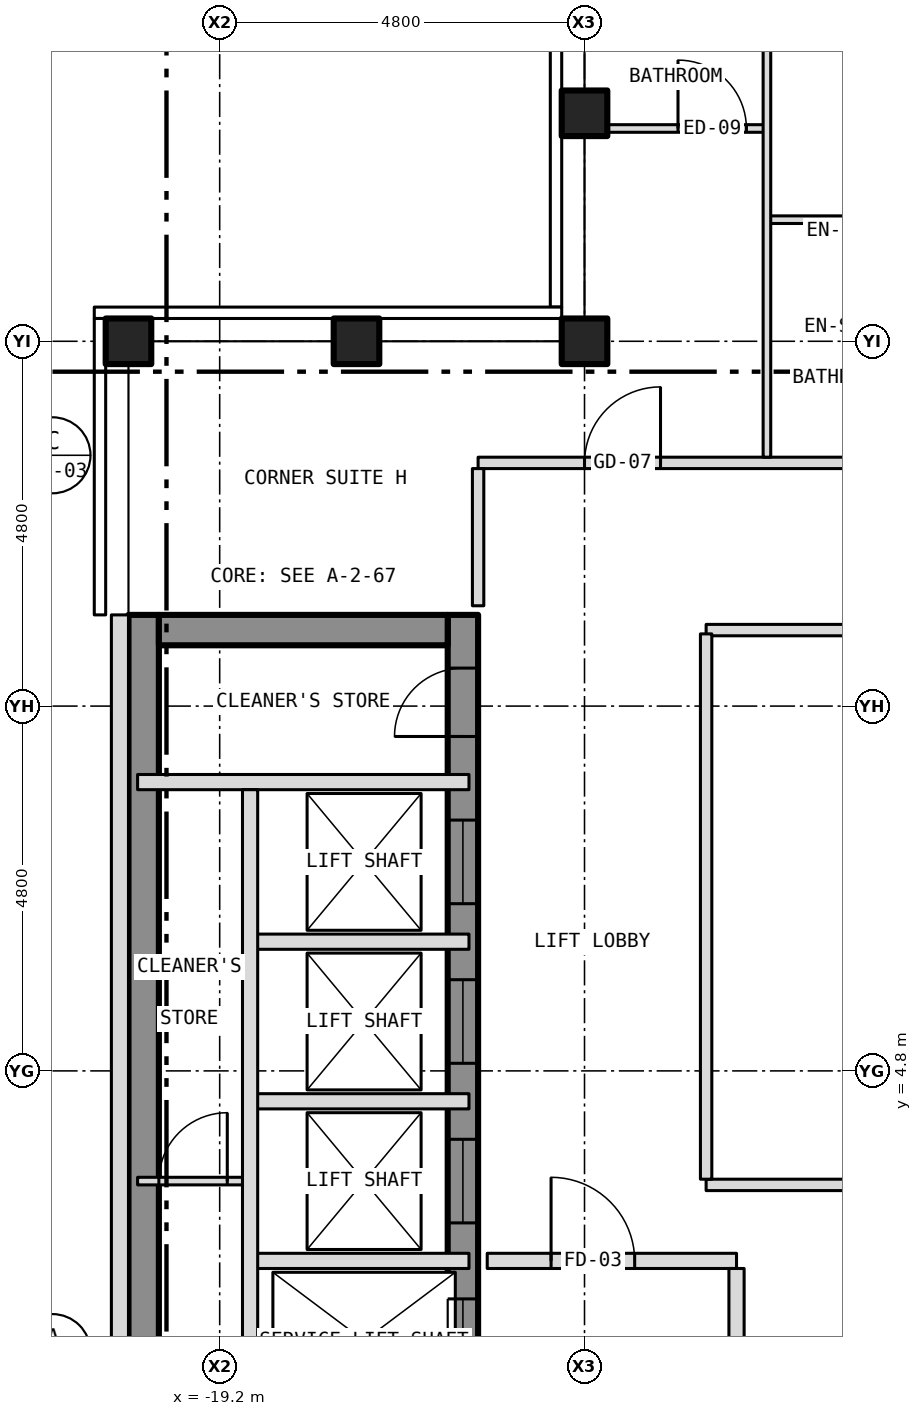
"""IFC4 building model, lengths in metres.
Left out: names, types, materials, properties, quantities, classifications, styles, units other than length and angle.
Written with IfcOpenShell. Run it as: python <this file> out.ifc"""

import sys

from ifc_helpers import new_model, si_unit, direction, frame, frame_2d, origin, origin_2d, place, context, subcontext, project, spatial, rectangle, hollow_rectangle, extrude, element, fill, save


model = new_model("IFC4")
c1 = context("Model", 3, precision=1e-05, world=origin(), true_north=direction((0.0, 1.0)))
c2 = subcontext(c1, "Body", "Model", "MODEL_VIEW")
j1 = project(units=[si_unit("LENGTHUNIT", "METRE"), si_unit("PLANEANGLEUNIT", "RADIAN")], contexts=[c1])
p1 = place(None, origin())
s1 = spatial("IfcSite", under=j1, at=p1, CompositionType="ELEMENT")
p2 = place(p1, origin())
s2 = spatial("IfcBuilding", under=s1, at=p2, CompositionType="ELEMENT")
p3 = place(p2, frame((0.0, 0.0, 244.5)))
s3 = spatial("IfcBuildingStorey", under=s2, at=p3, CompositionType="ELEMENT", Elevation=244.5)
for number, where, z_axis, x_axis in (
    (1, (-20.4, 14.4, -0.15), (0.0, 0.0, 1.0), (1.0, 0.0, 0.0)),
    (2, (-14.4, 14.4, -0.15), (0.0, 0.0, 1.0), (1.0, 0.0, 0.0)),
    (3, (-14.4, 17.4, -0.15), (0.0, 0.0, 1.0), (1.0, 0.0, 0.0)),
    (4, (-17.4, 14.4, -0.15), (0.0, 0.0, 1.0), (1.0, 0.0, 0.0)),
):
    element("IfcColumn", number, at=place(p3, frame(where, z_axis=z_axis, x_axis=x_axis)), inside=s3, PredefinedType="COLUMN", context=c2, shape_type="SweptSolid", body=[
        extrude(hollow_rectangle(XDim=0.6, YDim=0.6, WallThickness=0.03, at=origin_2d()), origin(), (0.0, 0.0, 1.0), 3.5),
    ])
p4 = place(p3, frame((-16.0, -10.8, 0.0), z_axis=(0.0, 0.0, 1.0), x_axis=(0.0, 1.0, 0.0)))
e5 = element("IfcWall", 5, at=p4, inside=s3, PredefinedType="SHEAR", context=c2, shape_type="SweptSolid", body=[
    extrude(rectangle(XDim=21.6, YDim=0.4, at=frame_2d((10.8, 0.0))), origin(), (0.0, 0.0, 1.0), 3.25),
])
p5 = place(p4, frame((9.4, 0.0, 0.0)))
e6 = element("IfcOpeningElement", 6, at=p5, cuts=e5, PredefinedType="OPENING", context=c2, shape_type="SweptSolid", body=[
    extrude(rectangle(XDim=1.1, YDim=2.1, at=frame_2d((0.55, 1.05))), frame((0.0, 0.212, 0.0), z_axis=(0.0, -1.0, 0.0), x_axis=(1.0, 0.0, 0.0)), (0.0, 0.0, 1.0), 0.424),
])
p6 = place(p4, frame((11.5, 0.0, 0.0)))
e7 = element("IfcOpeningElement", 7, at=p6, cuts=e5, PredefinedType="OPENING", context=c2, shape_type="SweptSolid", body=[
    extrude(rectangle(XDim=1.1, YDim=2.1, at=frame_2d((0.55, 1.05))), frame((0.0, 0.212, 0.0), z_axis=(0.0, -1.0, 0.0), x_axis=(1.0, 0.0, 0.0)), (0.0, 0.0, 1.0), 0.424),
])
p7 = place(p4, frame((13.6, 0.0, 0.0)))
e8 = element("IfcOpeningElement", 8, at=p7, cuts=e5, PredefinedType="OPENING", context=c2, shape_type="SweptSolid", body=[
    extrude(rectangle(XDim=1.1, YDim=2.1, at=frame_2d((0.55, 1.05))), frame((0.0, 0.212, 0.0), z_axis=(0.0, -1.0, 0.0), x_axis=(1.0, 0.0, 0.0)), (0.0, 0.0, 1.0), 0.424),
])
p8 = place(p4, frame((15.7, 0.0, 0.0)))
e9 = element("IfcOpeningElement", 9, at=p8, cuts=e5, PredefinedType="OPENING", context=c2, shape_type="SweptSolid", body=[
    extrude(rectangle(XDim=1.1, YDim=2.1, at=frame_2d((0.55, 1.05))), frame((0.0, 0.212, 0.0), z_axis=(0.0, -1.0, 0.0), x_axis=(1.0, 0.0, 0.0)), (0.0, 0.0, 1.0), 0.424),
])
p9 = place(p4, frame((17.8, 0.0, 0.0)))
e10 = element("IfcOpeningElement", 10, at=p9, cuts=e5, PredefinedType="OPENING", context=c2, shape_type="SweptSolid", body=[
    extrude(rectangle(XDim=1.1, YDim=2.1, at=frame_2d((0.55, 1.05))), frame((0.0, 0.212, 0.0), z_axis=(0.0, -1.0, 0.0), x_axis=(1.0, 0.0, 0.0)), (0.0, 0.0, 1.0), 0.424),
])
p10 = place(p4, frame((0.458, 0.0, 0.0)))
e11 = element("IfcOpeningElement", 11, at=p10, cuts=e5, PredefinedType="OPENING", context=c2, shape_type="SweptSolid", body=[
    extrude(rectangle(XDim=1.1, YDim=2.1, at=frame_2d((0.55, 1.05))), frame((0.0, 0.212, 0.0), z_axis=(0.0, -1.0, 0.0), x_axis=(1.0, 0.0, 0.0)), (0.0, 0.0, 1.0), 0.424),
])
p11 = place(p4, frame((7.5, 0.0, 0.0)))
e12 = element("IfcOpeningElement", 12, at=p11, cuts=e5, PredefinedType="OPENING", context=c2, shape_type="SweptSolid", body=[
    extrude(rectangle(XDim=1.1, YDim=2.1, at=frame_2d((0.55, 1.05))), frame((0.0, 0.212, 0.0), z_axis=(0.0, -1.0, 0.0), x_axis=(1.0, 0.0, 0.0)), (0.0, 0.0, 1.0), 0.424),
])
p12 = place(p4, frame((20.0, 0.0, 0.0)))
e13 = element("IfcOpeningElement", 13, at=p12, cuts=e5, PredefinedType="OPENING", context=c2, shape_type="SweptSolid", body=[
    extrude(rectangle(XDim=0.9, YDim=2.1, at=frame_2d((0.45, 1.05))), frame((0.0, 0.212, 0.0), z_axis=(0.0, -1.0, 0.0), x_axis=(1.0, 0.0, 0.0)), (0.0, 0.0, 1.0), 0.424),
])
p13 = place(p3, frame((-20.2, -10.8, 0.0), z_axis=(0.0, 0.0, 1.0), x_axis=(0.0, 1.0, 0.0)))
e14 = element("IfcWall", 14, at=p13, inside=s3, PredefinedType="SHEAR", context=c2, shape_type="SweptSolid", body=[
    extrude(rectangle(XDim=21.6, YDim=0.4, at=frame_2d((10.8, 0.0))), origin(), (0.0, 0.0, 1.0), 3.25),
])
p14 = place(p3, frame((-20.0, 10.6, 0.0), z_axis=(0.0, 0.0, 1.0), x_axis=(1.0, 0.0, 0.0)))
e15 = element("IfcWall", 15, at=p14, inside=s3, PredefinedType="SHEAR", context=c2, shape_type="SweptSolid", body=[
    extrude(rectangle(XDim=3.8, YDim=0.4, at=frame_2d((1.9, 0.0))), origin(), (0.0, 0.0, 1.0), 3.25),
])
p15 = place(p3, frame((-20.512, 10.8, 0.0), z_axis=(0.0, 0.0, 1.0), x_axis=(0.0, -1.0, 0.0)))
e16 = element("IfcWall", 16, at=p15, inside=s3, PredefinedType="SOLIDWALL", context=c2, shape_type="SweptSolid", body=[
    extrude(rectangle(XDim=21.6, YDim=0.225, at=frame_2d((10.8, 0.0))), origin(), (0.0, 0.0, 1.0), 3.5),
])
p16 = place(p15, frame((18.05, 0.0, 1.0)))
e17 = element("IfcOpeningElement", 17, at=p16, cuts=e16, PredefinedType="OPENING", context=c2, shape_type="SweptSolid", body=[
    extrude(rectangle(XDim=0.6, YDim=1.5, at=frame_2d((0.3, 0.75))), frame((0.0, 0.125, 0.0), z_axis=(0.0, -1.0, 0.0), x_axis=(1.0, 0.0, 0.0)), (0.0, 0.0, 1.0), 0.249),
])
p17 = place(p3, frame((-18.8, 2.3, 0.0), z_axis=(0.0, 0.0, 1.0), x_axis=(1.0, 0.0, 0.0)))
e18 = element("IfcWall", 18, at=p17, inside=s3, PredefinedType="PARTITIONING", context=c2, shape_type="SweptSolid", body=[
    extrude(rectangle(XDim=2.88, YDim=0.2, at=frame_2d((1.44, 0.0))), origin(), (0.0, 0.0, 1.0), 3.25),
])
p18 = place(p3, frame((-15.68, 2.3, 0.0), z_axis=(0.0, 0.0, 1.0), x_axis=(1.0, 0.0, 0.0)))
e19 = element("IfcWall", 19, at=p18, inside=s3, PredefinedType="PARTITIONING", context=c2, shape_type="SweptSolid", body=[
    extrude(rectangle(XDim=3.28, YDim=0.2, at=frame_2d((1.64, 0.0))), origin(), (0.0, 0.0, 1.0), 3.35),
])
p19 = place(p18, frame((0.84, 0.0, 0.0)))
e20 = element("IfcOpeningElement", 20, at=p19, cuts=e19, PredefinedType="OPENING", context=c2, shape_type="SweptSolid", body=[
    extrude(rectangle(XDim=1.1, YDim=2.1, at=frame_2d((0.55, 1.05))), frame((0.0, 0.112, 0.0), z_axis=(0.0, -1.0, 0.0), x_axis=(1.0, 0.0, 0.0)), (0.0, 0.0, 1.0), 0.224),
])
p20 = place(p3, frame((-12.8, 3.3, 0.0), z_axis=(0.0, 0.0, 1.0), x_axis=(1.0, 0.0, 0.0)))
e21 = element("IfcWall", 21, at=p20, inside=s3, PredefinedType="PARTITIONING", context=c2, shape_type="SweptSolid", body=[
    extrude(rectangle(XDim=20.3, YDim=0.15, at=frame_2d((10.15, 0.0))), origin(), (0.0, 0.0, 1.0), 3.35),
])
p21 = place(p20, frame((16.1, 0.0, 0.0)))
e22 = element("IfcOpeningElement", 22, at=p21, cuts=e21, PredefinedType="OPENING", context=c2, shape_type="SweptSolid", body=[
    extrude(rectangle(XDim=0.9, YDim=2.1, at=frame_2d((0.45, 1.05))), frame((0.0, 0.087, 0.0), z_axis=(0.0, -1.0, 0.0), x_axis=(1.0, 0.0, 0.0)), (0.0, 0.0, 1.0), 0.174),
])
p22 = place(p3, frame((-20.28, 3.35, 0.0), z_axis=(0.0, 0.0, 1.0), x_axis=(1.0, 0.0, 0.0)))
e23 = element("IfcWall", 23, at=p22, inside=s3, PredefinedType="PARTITIONING", context=c2, shape_type="SweptSolid", body=[
    extrude(rectangle(XDim=1.48, YDim=0.1, at=frame_2d((0.74, 0.0))), origin(), (0.0, 0.0, 1.0), 3.25),
])
p23 = place(p22, frame((0.28, 0.0, 0.0)))
e24 = element("IfcOpeningElement", 24, at=p23, cuts=e23, PredefinedType="OPENING", context=c2, shape_type="SweptSolid", body=[
    extrude(rectangle(XDim=0.9, YDim=2.1, at=frame_2d((0.45, 1.05))), frame((0.0, 0.062, 0.0), z_axis=(0.0, -1.0, 0.0), x_axis=(1.0, 0.0, 0.0)), (0.0, 0.0, 1.0), 0.124),
])
for number, where, z_axis, x_axis in (
    (25, (-18.8, 4.4, 0.0), (0.0, 0.0, 1.0), (1.0, 0.0, 0.0)),
    (26, (-18.8, 6.5, 0.0), (0.0, 0.0, 1.0), (1.0, 0.0, 0.0)),
):
    element("IfcWall", number, at=place(p3, frame(where, z_axis=z_axis, x_axis=x_axis)), inside=s3, PredefinedType="PARTITIONING", context=c2, shape_type="SweptSolid", body=[
        extrude(rectangle(XDim=2.88, YDim=0.2, at=frame_2d((1.44, 0.0))), origin(), (0.0, 0.0, 1.0), 3.25),
    ])
p24 = place(p3, frame((-20.28, 8.6, 0.0), z_axis=(0.0, 0.0, 1.0), x_axis=(1.0, 0.0, 0.0)))
e27 = element("IfcWall", 27, at=p24, inside=s3, PredefinedType="PARTITIONING", context=c2, shape_type="SweptSolid", body=[
    extrude(rectangle(XDim=4.36, YDim=0.2, at=frame_2d((2.18, 0.0))), origin(), (0.0, 0.0, 1.0), 3.25),
])
p25 = place(p3, frame((-12.8, 10.6, 0.0), z_axis=(0.0, 0.0, 1.0), x_axis=(1.0, 0.0, 0.0)))
e28 = element("IfcWall", 28, at=p25, inside=s3, PredefinedType="PARTITIONING", context=c2, shape_type="SweptSolid", body=[
    extrude(rectangle(XDim=20.3, YDim=0.15, at=frame_2d((10.15, 0.0))), origin(), (0.0, 0.0, 1.0), 3.35),
])
p26 = place(p25, frame((5.95, 0.0, 0.0)))
e29 = element("IfcOpeningElement", 29, at=p26, cuts=e28, PredefinedType="OPENING", context=c2, shape_type="SweptSolid", body=[
    extrude(rectangle(XDim=0.9, YDim=2.1, at=frame_2d((0.45, 1.05))), frame((0.0, 0.087, 0.0), z_axis=(0.0, -1.0, 0.0), x_axis=(1.0, 0.0, 0.0)), (0.0, 0.0, 1.0), 0.174),
])
p27 = place(p3, frame((-15.8, 12.8, 0.0), z_axis=(0.0, 0.0, 1.0), x_axis=(1.0, 0.0, 0.0)))
e30 = element("IfcWall", 30, at=p27, inside=s3, PredefinedType="PARTITIONING", context=c2, shape_type="SweptSolid", body=[
    extrude(rectangle(XDim=31.6, YDim=0.15, at=frame_2d((15.8, 0.0))), origin(), (0.0, 0.0, 1.0), 3.35),
])
p28 = place(p27, frame((6.8, 0.0, 0.0)))
e31 = element("IfcOpeningElement", 31, at=p28, cuts=e30, PredefinedType="OPENING", context=c2, shape_type="SweptSolid", body=[
    extrude(rectangle(XDim=1.0, YDim=2.1, at=frame_2d((0.5, 1.05))), frame((0.0, 0.087, 0.0), z_axis=(0.0, -1.0, 0.0), x_axis=(1.0, 0.0, 0.0)), (0.0, 0.0, 1.0), 0.174),
])
p29 = place(p27, frame((15.35, 0.0, 0.0)))
e32 = element("IfcOpeningElement", 32, at=p29, cuts=e30, PredefinedType="OPENING", context=c2, shape_type="SweptSolid", body=[
    extrude(rectangle(XDim=0.9, YDim=2.1, at=frame_2d((0.45, 1.05))), frame((0.0, 0.087, 0.0), z_axis=(0.0, -1.0, 0.0), x_axis=(1.0, 0.0, 0.0)), (0.0, 0.0, 1.0), 0.174),
])
p30 = place(p27, frame((26.0, 0.0, 0.0)))
e33 = element("IfcOpeningElement", 33, at=p30, cuts=e30, PredefinedType="OPENING", context=c2, shape_type="SweptSolid", body=[
    extrude(rectangle(XDim=1.0, YDim=2.1, at=frame_2d((0.5, 1.05))), frame((0.0, 0.087, 0.0), z_axis=(0.0, -1.0, 0.0), x_axis=(1.0, 0.0, 0.0)), (0.0, 0.0, 1.0), 0.174),
])
p31 = place(p27, frame((1.4, 0.0, 0.0)))
e34 = element("IfcOpeningElement", 34, at=p31, cuts=e30, PredefinedType="OPENING", context=c2, shape_type="SweptSolid", body=[
    extrude(rectangle(XDim=1.0, YDim=2.1, at=frame_2d((0.5, 1.05))), frame((0.0, 0.087, 0.0), z_axis=(0.0, -1.0, 0.0), x_axis=(1.0, 0.0, 0.0)), (0.0, 0.0, 1.0), 0.174),
])
p32 = place(p27, frame((29.2, 0.0, 0.0)))
e35 = element("IfcOpeningElement", 35, at=p32, cuts=e30, PredefinedType="OPENING", context=c2, shape_type="SweptSolid", body=[
    extrude(rectangle(XDim=1.0, YDim=2.1, at=frame_2d((0.5, 1.05))), frame((0.0, 0.087, 0.0), z_axis=(0.0, -1.0, 0.0), x_axis=(1.0, 0.0, 0.0)), (0.0, 0.0, 1.0), 0.174),
])
p33 = place(p3, frame((-12.0, 16.0, 0.0), z_axis=(0.0, 0.0, 1.0), x_axis=(1.0, 0.0, 0.0)))
e36 = element("IfcWall", 36, at=p33, inside=s3, PredefinedType="PARTITIONING", context=c2, shape_type="SweptSolid", body=[
    extrude(rectangle(XDim=2.2, YDim=0.1, at=frame_2d((1.1, 0.0))), origin(), (0.0, 0.0, 1.0), 3.35),
])
p34 = place(p3, frame((-14.28, 17.2, 0.0), z_axis=(0.0, 0.0, 1.0), x_axis=(1.0, 0.0, 0.0)))
e37 = element("IfcWall", 37, at=p34, inside=s3, PredefinedType="PARTITIONING", context=c2, shape_type="SweptSolid", body=[
    extrude(rectangle(XDim=2.28, YDim=0.1, at=frame_2d((1.14, 0.0))), origin(), (0.0, 0.0, 1.0), 3.35),
])
p35 = place(p34, frame((1.11, 0.0, 0.0)))
e38 = element("IfcOpeningElement", 38, at=p35, cuts=e37, PredefinedType="OPENING", context=c2, shape_type="SweptSolid", body=[
    extrude(rectangle(XDim=0.9, YDim=2.1, at=frame_2d((0.45, 1.05))), frame((0.0, 0.062, 0.0), z_axis=(0.0, -1.0, 0.0), x_axis=(1.0, 0.0, 0.0)), (0.0, 0.0, 1.0), 0.124),
])
p36 = place(p3, frame((-18.8, -1.8, 0.0), z_axis=(0.0, 0.0, 1.0), x_axis=(0.0, 1.0, 0.0)))
e39 = element("IfcWall", 39, at=p36, inside=s3, PredefinedType="PARTITIONING", context=c2, shape_type="SweptSolid", body=[
    extrude(rectangle(XDim=10.3, YDim=0.2, at=frame_2d((5.15, 0.0))), origin(), (0.0, 0.0, 1.0), 3.25),
])
p37 = place(p3, frame((-15.8, 10.92, 0.0), z_axis=(0.0, 0.0, 1.0), x_axis=(0.0, 1.0, 0.0)))
e40 = element("IfcWall", 40, at=p37, inside=s3, PredefinedType="PARTITIONING", context=c2, shape_type="SweptSolid", body=[
    extrude(rectangle(XDim=1.805, YDim=0.15, at=frame_2d((0.903, 0.0))), origin(), (0.0, 0.0, 1.0), 3.35),
])
p38 = place(p3, frame((-12.8, 3.375, 0.0), z_axis=(0.0, 0.0, 1.0), x_axis=(0.0, 1.0, 0.0)))
e41 = element("IfcWall", 41, at=p38, inside=s3, PredefinedType="PARTITIONING", context=c2, shape_type="SweptSolid", body=[
    extrude(rectangle(XDim=7.175, YDim=0.15, at=frame_2d((3.587, 0.0))), origin(), (0.0, 0.0, 1.0), 3.35),
])
p39 = place(p3, frame((-12.4, -1.8, 0.0), z_axis=(0.0, 0.0, 1.0), x_axis=(0.0, 1.0, 0.0)))
e42 = element("IfcWall", 42, at=p39, inside=s3, PredefinedType="PARTITIONING", context=c2, shape_type="SweptSolid", body=[
    extrude(rectangle(XDim=4.0, YDim=0.2, at=frame_2d((2.0, 0.0))), origin(), (0.0, 0.0, 1.0), 3.35),
])
p40 = place(p3, frame((-12.0, 12.875, 0.0), z_axis=(0.0, 0.0, 1.0), x_axis=(0.0, 1.0, 0.0)))
e43 = element("IfcWall", 43, at=p40, inside=s3, PredefinedType="PARTITIONING", context=c2, shape_type="SweptSolid", body=[
    extrude(rectangle(XDim=7.855, YDim=0.1, at=frame_2d((3.927, 0.0))), origin(), (0.0, 0.0, 1.0), 3.35),
])
p41 = place(p6, origin())
e44 = element("IfcDoor", 44, at=p41, inside=s3, OperationType="SLIDING_TO_LEFT", PredefinedType="DOOR", context=c2, shape_type="SweptSolid", body=[
    extrude(rectangle(XDim=1.1, YDim=2.1, at=frame_2d((0.55, 1.05))), frame((0.0, 0.025, 0.0), z_axis=(0.0, -1.0, 0.0), x_axis=(1.0, 0.0, 0.0)), (0.0, 0.0, 1.0), 0.05),
])
fill(e7, e44)
p42 = place(p7, origin())
e45 = element("IfcDoor", 45, at=p42, inside=s3, OperationType="SLIDING_TO_LEFT", PredefinedType="DOOR", context=c2, shape_type="SweptSolid", body=[
    extrude(rectangle(XDim=1.1, YDim=2.1, at=frame_2d((0.55, 1.05))), frame((0.0, 0.025, 0.0), z_axis=(0.0, -1.0, 0.0), x_axis=(1.0, 0.0, 0.0)), (0.0, 0.0, 1.0), 0.05),
])
fill(e8, e45)
p43 = place(p8, origin())
e46 = element("IfcDoor", 46, at=p43, inside=s3, OperationType="SLIDING_TO_LEFT", PredefinedType="DOOR", context=c2, shape_type="SweptSolid", body=[
    extrude(rectangle(XDim=1.1, YDim=2.1, at=frame_2d((0.55, 1.05))), frame((0.0, 0.025, 0.0), z_axis=(0.0, -1.0, 0.0), x_axis=(1.0, 0.0, 0.0)), (0.0, 0.0, 1.0), 0.05),
])
fill(e9, e46)
p44 = place(p9, origin())
e47 = element("IfcDoor", 47, at=p44, inside=s3, OperationType="SLIDING_TO_LEFT", PredefinedType="DOOR", context=c2, shape_type="SweptSolid", body=[
    extrude(rectangle(XDim=1.1, YDim=2.1, at=frame_2d((0.55, 1.05))), frame((0.0, 0.025, 0.0), z_axis=(0.0, -1.0, 0.0), x_axis=(1.0, 0.0, 0.0)), (0.0, 0.0, 1.0), 0.05),
])
fill(e10, e47)
p45 = place(p12, origin())
e48 = element("IfcDoor", 48, at=p45, inside=s3, OperationType="SINGLE_SWING_LEFT", PredefinedType="DOOR", context=c2, shape_type="SweptSolid", body=[
    extrude(rectangle(XDim=0.9, YDim=2.1, at=frame_2d((0.45, 1.05))), frame((0.0, 0.025, 0.0), z_axis=(0.0, -1.0, 0.0), x_axis=(1.0, 0.0, 0.0)), (0.0, 0.0, 1.0), 0.05),
])
fill(e13, e48)
p46 = place(p23, origin())
e49 = element("IfcDoor", 49, at=p46, inside=s3, OperationType="SINGLE_SWING_RIGHT", PredefinedType="DOOR", context=c2, shape_type="SweptSolid", body=[
    extrude(rectangle(XDim=0.9, YDim=2.1, at=frame_2d((0.45, 1.05))), frame((0.0, 0.025, 0.0), z_axis=(0.0, -1.0, 0.0), x_axis=(1.0, 0.0, 0.0)), (0.0, 0.0, 1.0), 0.05),
])
fill(e24, e49)
p47 = place(p19, origin())
e50 = element("IfcDoor", 50, at=p47, inside=s3, OperationType="SINGLE_SWING_LEFT", PredefinedType="DOOR", context=c2, shape_type="SweptSolid", body=[
    extrude(rectangle(XDim=1.1, YDim=2.1, at=frame_2d((0.55, 1.05))), frame((0.0, 0.025, 0.0), z_axis=(0.0, -1.0, 0.0), x_axis=(1.0, 0.0, 0.0)), (0.0, 0.0, 1.0), 0.05),
])
fill(e20, e50)
p48 = place(p35, origin())
e51 = element("IfcDoor", 51, at=p48, inside=s3, OperationType="SINGLE_SWING_LEFT", PredefinedType="DOOR", context=c2, shape_type="SweptSolid", body=[
    extrude(rectangle(XDim=0.9, YDim=2.1, at=frame_2d((0.45, 1.05))), frame((0.0, 0.025, 0.0), z_axis=(0.0, -1.0, 0.0), x_axis=(1.0, 0.0, 0.0)), (0.0, 0.0, 1.0), 0.05),
])
fill(e38, e51)
p49 = place(p31, origin())
e52 = element("IfcDoor", 52, at=p49, inside=s3, OperationType="SINGLE_SWING_RIGHT", PredefinedType="DOOR", context=c2, shape_type="SweptSolid", body=[
    extrude(rectangle(XDim=1.0, YDim=2.1, at=frame_2d((0.5, 1.05))), frame((0.0, 0.025, 0.0), z_axis=(0.0, -1.0, 0.0), x_axis=(1.0, 0.0, 0.0)), (0.0, 0.0, 1.0), 0.05),
])
fill(e34, e52)
save(model, sys.argv[1])
